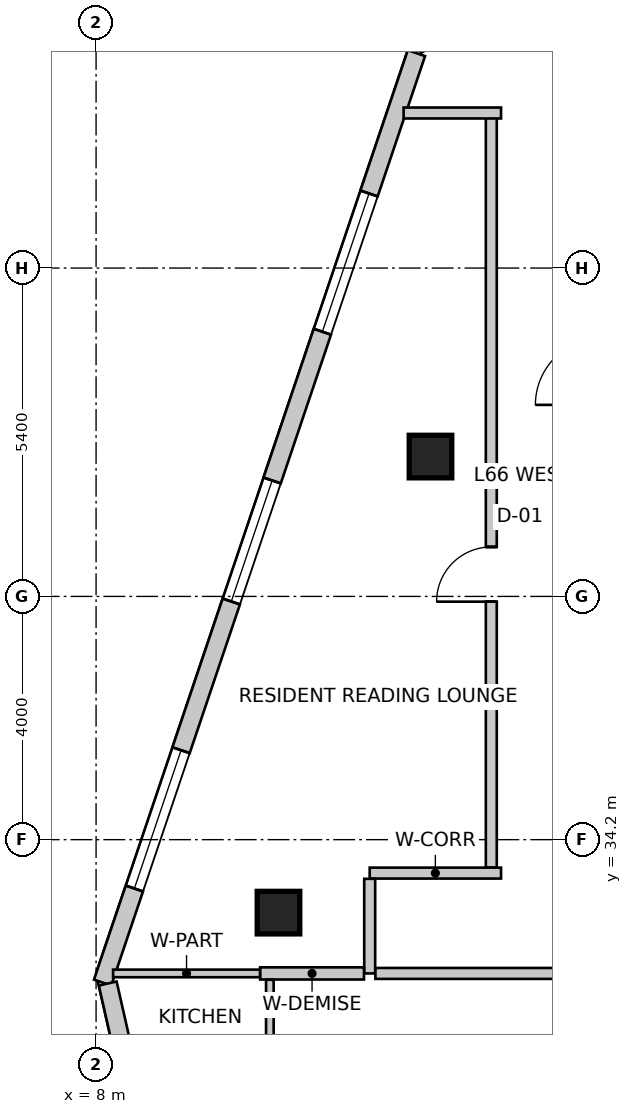
"""IFC4 building model, lengths in metres.
Left out: names, types, materials, properties, quantities, classifications, styles, units other than length and angle.
Written with IfcOpenShell. Run it as: python <this file> out.ifc"""

import sys

from ifc_helpers import new_model, si_unit, direction, frame, frame_2d, origin, origin_2d, place, context, subcontext, project, spatial, rectangle, extrude, source, transform, mapped, element, fill, save


model = new_model("IFC4")
c1 = context("Model", 3, precision=1e-05, world=origin(), true_north=direction((0.0, 1.0)))
c2 = subcontext(c1, "Body", "Model", "MODEL_VIEW")
j1 = project(units=[si_unit("LENGTHUNIT", "METRE"), si_unit("PLANEANGLEUNIT", "RADIAN")], contexts=[c1])
p1 = place(None, origin())
s1 = spatial("IfcSite", under=j1, at=p1, CompositionType="ELEMENT")
p2 = place(p1, origin())
s2 = spatial("IfcBuilding", under=s1, at=p2, CompositionType="ELEMENT")
p3 = place(p2, frame((0.0, 0.0, 260.1)))
s3 = spatial("IfcBuildingStorey", under=s2, at=p3, CompositionType="ELEMENT", Elevation=260.1)
m1 = source(origin(), c2, "Body", "SweptSolid", [
    extrude(rectangle(XDim=0.7, YDim=0.7, at=origin_2d()), origin(), (0.0, 0.0, 1.0), 3.6),
])
for number, where, z_axis, x_axis in (
    (1, (11.0, 33.0, 0.0), (0.0, 0.0, 1.0), (1.0, 0.0, 0.0)),
    (2, (13.5, 40.5, 0.0), (0.0, 0.0, 1.0), (1.0, 0.0, 0.0)),
):
    element("IfcColumn", number, at=place(p3, frame(where, z_axis=z_axis, x_axis=x_axis)), inside=s3, PredefinedType="COLUMN", context=c2, shape_type="MappedRepresentation", body=[
        mapped(m1, transform((0.0, 0.0, 0.0), scale=1.0)),
    ])
p4 = place(p3, frame((21.874, 52.742, 0.0), z_axis=(0.0, 0.0, 1.0), x_axis=(-0.84365659959, -0.536883173482, 0.0)))
e3 = element("IfcWall", 3, at=p4, inside=s3, PredefinedType="SOLIDWALL", context=c2, shape_type="SweptSolid", body=[
    extrude(rectangle(XDim=10.283, YDim=0.3, at=frame_2d((5.142, 0.0))), origin(), (0.0, 0.0, 1.0), 3.35),
])
m2 = source(origin(), c2, "Body", "SweptSolid", [
    extrude(rectangle(XDim=2.1, YDim=2.0, at=frame_2d((1.05, 1.0))), frame((0.0, 0.16, 0.0), z_axis=(0.0, -1.0, 0.0), x_axis=(1.0, 0.0, 0.0)), (0.0, 0.0, 1.0), 0.32),
])
p5 = place(p4, frame((1.41, 0.0, 0.85)))
e4 = element("IfcOpeningElement", 4, at=p5, cuts=e3, PredefinedType="OPENING", context=c2, shape_type="MappedRepresentation", body=[
    mapped(m2, transform((0.0, 0.0, 0.0), scale=1.0)),
])
m3 = source(origin(), c2, "Body", "SweptSolid", [
    extrude(rectangle(XDim=2.4, YDim=2.2, at=frame_2d((1.2, 1.1))), frame((0.0, 0.16, 0.0), z_axis=(0.0, -1.0, 0.0), x_axis=(1.0, 0.0, 0.0)), (0.0, 0.0, 1.0), 0.32),
])
p6 = place(p4, frame((5.54, 0.0, 0.85)))
e5 = element("IfcOpeningElement", 5, at=p6, cuts=e3, PredefinedType="OPENING", context=c2, shape_type="MappedRepresentation", body=[
    mapped(m3, transform((0.0, 0.0, 0.0), scale=1.0)),
])
p7 = place(p3, frame((13.269, 47.134, 0.0), z_axis=(0.0, 0.0, 1.0), x_axis=(-0.3199211297, -0.947444178182, 0.0)))
e6 = element("IfcWall", 6, at=p7, inside=s3, PredefinedType="SOLIDWALL", context=c2, shape_type="SweptSolid", body=[
    extrude(rectangle(XDim=16.132, YDim=0.3, at=frame_2d((8.066, 0.0))), origin(), (0.0, 0.0, 1.0), 3.35),
])
p8 = place(p7, frame((2.435, 0.0, 0.85)))
e7 = element("IfcOpeningElement", 7, at=p8, cuts=e6, PredefinedType="OPENING", context=c2, shape_type="MappedRepresentation", body=[
    mapped(m3, transform((0.0, 0.0, 0.0), scale=1.0)),
])
p9 = place(p7, frame((7.417, 0.0, 0.85)))
e8 = element("IfcOpeningElement", 8, at=p9, cuts=e6, PredefinedType="OPENING", context=c2, shape_type="MappedRepresentation", body=[
    mapped(m2, transform((0.0, 0.0, 0.0), scale=1.0)),
])
p10 = place(p7, frame((12.099, 0.0, 0.85)))
e9 = element("IfcOpeningElement", 9, at=p10, cuts=e6, PredefinedType="OPENING", context=c2, shape_type="MappedRepresentation", body=[
    mapped(m3, transform((0.0, 0.0, 0.0), scale=1.0)),
])
p11 = place(p3, frame((8.191, 31.834, 0.0), z_axis=(0.0, 0.0, 1.0), x_axis=(0.221636032737, -0.975129462683, 0.0)))
e10 = element("IfcWall", 10, at=p11, inside=s3, PredefinedType="SOLIDWALL", context=c2, shape_type="SweptSolid", body=[
    extrude(rectangle(XDim=10.602, YDim=0.3, at=frame_2d((5.301, 0.0))), origin(), (0.0, 0.0, 1.0), 3.35),
])
p12 = place(p11, frame((2.501, 0.0, 0.85)))
e11 = element("IfcOpeningElement", 11, at=p12, cuts=e10, PredefinedType="OPENING", context=c2, shape_type="MappedRepresentation", body=[
    mapped(m2, transform((0.0, 0.0, 0.0), scale=1.0)),
])
p13 = place(p11, frame((7.702, 0.0, 0.85)))
e12 = element("IfcOpeningElement", 12, at=p13, cuts=e10, PredefinedType="OPENING", context=c2, shape_type="MappedRepresentation", body=[
    mapped(m2, transform((0.0, 0.0, 0.0), scale=1.0)),
])
p14 = place(p3, frame((12.5, 33.65, 0.0), z_axis=(0.0, 0.0, 1.0), x_axis=(1.0, 0.0, 0.0)))
e13 = element("IfcWall", 13, at=p14, inside=s3, PredefinedType="PARTITIONING", context=c2, shape_type="SweptSolid", body=[
    extrude(rectangle(XDim=2.16, YDim=0.18, at=frame_2d((1.08, 0.0))), origin(), (0.0, 0.0, 1.0), 3.35),
])
p15 = place(p3, frame((12.5, 32.0, 0.0), z_axis=(0.0, 0.0, 1.0), x_axis=(0.0, 1.0, 0.0)))
e14 = element("IfcWall", 14, at=p15, inside=s3, PredefinedType="PARTITIONING", context=c2, shape_type="SweptSolid", body=[
    extrude(rectangle(XDim=1.556, YDim=0.18, at=frame_2d((0.778, 0.0))), origin(), (0.0, 0.0, 1.0), 2.935),
])
p16 = place(p3, frame((18.36, 32.0, 0.0), z_axis=(0.0, 0.0, 1.0), x_axis=(-1.0, 0.0, 0.0)))
e15 = element("IfcWall", 15, at=p16, inside=s3, PredefinedType="PARTITIONING", context=c2, shape_type="SweptSolid", body=[
    extrude(rectangle(XDim=5.766, YDim=0.18, at=frame_2d((2.883, 0.0))), origin(), (0.0, 0.0, 1.0), 2.935),
])
p17 = place(p3, frame((14.5, 33.744, 0.0), z_axis=(0.0, 0.0, 1.0), x_axis=(0.0, 1.0, 0.0)))
e16 = element("IfcWall", 16, at=p17, inside=s3, PredefinedType="PARTITIONING", context=c2, shape_type="SweptSolid", body=[
    extrude(rectangle(XDim=12.406, YDim=0.18, at=frame_2d((6.203, 0.0))), origin(), (0.0, 0.0, 1.0), 3.35),
])
m4 = source(origin(), c2, "Body", "SweptSolid", [
    extrude(rectangle(XDim=0.9, YDim=2.15, at=frame_2d((0.45, 1.075))), frame((0.0, 0.1, 0.0), z_axis=(0.0, -1.0, 0.0), x_axis=(1.0, 0.0, 0.0)), (0.0, 0.0, 1.0), 0.2),
])
p18 = place(p17, frame((4.37, 0.0, 0.0)))
e17 = element("IfcOpeningElement", 17, at=p18, cuts=e16, PredefinedType="OPENING", context=c2, shape_type="MappedRepresentation", body=[
    mapped(m4, transform((0.0, 0.0, 0.0), scale=1.0)),
])
p19 = place(p3, frame((14.66, 46.15, 0.0), z_axis=(0.0, 0.0, 1.0), x_axis=(-1.0, 0.0, 0.0)))
e18 = element("IfcWall", 18, at=p19, inside=s3, PredefinedType="PARTITIONING", context=c2, shape_type="SweptSolid", body=[
    extrude(rectangle(XDim=1.602, YDim=0.18, at=frame_2d((0.801, 0.0))), origin(), (0.0, 0.0, 1.0), 3.35),
])
p20 = place(p3, frame((12.406, 32.0, 0.0), z_axis=(0.0, 0.0, 1.0), x_axis=(-1.0, 0.0, 0.0)))
e19 = element("IfcWall", 19, at=p20, inside=s3, PredefinedType="PARTITIONING", context=c2, shape_type="SweptSolid", body=[
    extrude(rectangle(XDim=1.708, YDim=0.2, at=frame_2d((0.854, 0.0))), origin(), (0.0, 0.0, 1.0), 2.642),
])
p21 = place(p3, frame((10.696, 32.0, 0.0), z_axis=(0.0, 0.0, 1.0), x_axis=(-1.0, 0.0, 0.0)))
e20 = element("IfcWall", 20, at=p21, inside=s3, PredefinedType="PARTITIONING", context=c2, shape_type="SweptSolid", body=[
    extrude(rectangle(XDim=2.416, YDim=0.125, at=frame_2d((1.208, 0.0))), origin(), (0.0, 0.0, 1.0), 3.35),
])
p22 = place(p3, frame((10.858, 25.032, 0.0), z_axis=(0.0, 0.0, 1.0), x_axis=(0.0, 1.0, 0.0)))
e21 = element("IfcWall", 21, at=p22, inside=s3, PredefinedType="PARTITIONING", context=c2, shape_type="SweptSolid", body=[
    extrude(rectangle(XDim=6.864, YDim=0.125, at=frame_2d((3.432, 0.0))), origin(), (0.0, 0.0, 1.0), 2.642),
])
m5 = source(origin(), c2, "Body", "SweptSolid", [
    extrude(rectangle(XDim=0.85, YDim=2.15, at=frame_2d((0.425, 1.075))), frame((0.0, 0.073, 0.0), z_axis=(0.0, -1.0, 0.0), x_axis=(1.0, 0.0, 0.0)), (0.0, 0.0, 1.0), 0.145),
])
p23 = place(p22, frame((0.886, 0.0, 0.0)))
e22 = element("IfcOpeningElement", 22, at=p23, cuts=e21, PredefinedType="OPENING", context=c2, shape_type="MappedRepresentation", body=[
    mapped(m5, transform((0.0, 0.0, 0.0), scale=1.0)),
])
m6 = source(origin(), c2, "Body", "SweptSolid", [
    extrude(rectangle(XDim=2.4, YDim=2.2, at=frame_2d((1.2, 1.1))), frame((0.0, -0.015, 0.0), z_axis=(0.0, -1.0, 0.0), x_axis=(1.0, 0.0, 0.0)), (0.0, 0.0, 1.0), 0.06),
])
p24 = place(p8, origin())
e23 = element("IfcWindow", 23, at=p24, inside=s3, PartitioningType="SINGLE_PANEL", PredefinedType="WINDOW", context=c2, shape_type="MappedRepresentation", body=[
    mapped(m6, transform((0.0, 0.0, 0.0), scale=1.0)),
])
fill(e7, e23)
m7 = source(origin(), c2, "Body", "SweptSolid", [
    extrude(rectangle(XDim=2.1, YDim=2.0, at=frame_2d((1.05, 1.0))), frame((0.0, -0.015, 0.0), z_axis=(0.0, -1.0, 0.0), x_axis=(1.0, 0.0, 0.0)), (0.0, 0.0, 1.0), 0.06),
])
p25 = place(p9, origin())
e24 = element("IfcWindow", 24, at=p25, inside=s3, PartitioningType="SINGLE_PANEL", PredefinedType="WINDOW", context=c2, shape_type="MappedRepresentation", body=[
    mapped(m7, transform((0.0, 0.0, 0.0), scale=1.0)),
])
fill(e8, e24)
p26 = place(p10, origin())
e25 = element("IfcWindow", 25, at=p26, inside=s3, PartitioningType="SINGLE_PANEL", PredefinedType="WINDOW", context=c2, shape_type="MappedRepresentation", body=[
    mapped(m6, transform((0.0, 0.0, 0.0), scale=1.0)),
])
fill(e9, e25)
m8 = source(origin(), c2, "Body", "SweptSolid", [
    extrude(rectangle(XDim=0.9, YDim=2.15, at=frame_2d((0.45, 1.075))), frame((0.0, 0.025, 0.0), z_axis=(0.0, -1.0, 0.0), x_axis=(1.0, 0.0, 0.0)), (0.0, 0.0, 1.0), 0.05),
])
p27 = place(p18, origin())
e26 = element("IfcDoor", 26, at=p27, inside=s3, OperationType="SINGLE_SWING_LEFT", PredefinedType="DOOR", context=c2, shape_type="MappedRepresentation", body=[
    mapped(m8, transform((0.0, 0.0, 0.0), scale=1.0)),
])
fill(e17, e26)
save(model, sys.argv[1])
